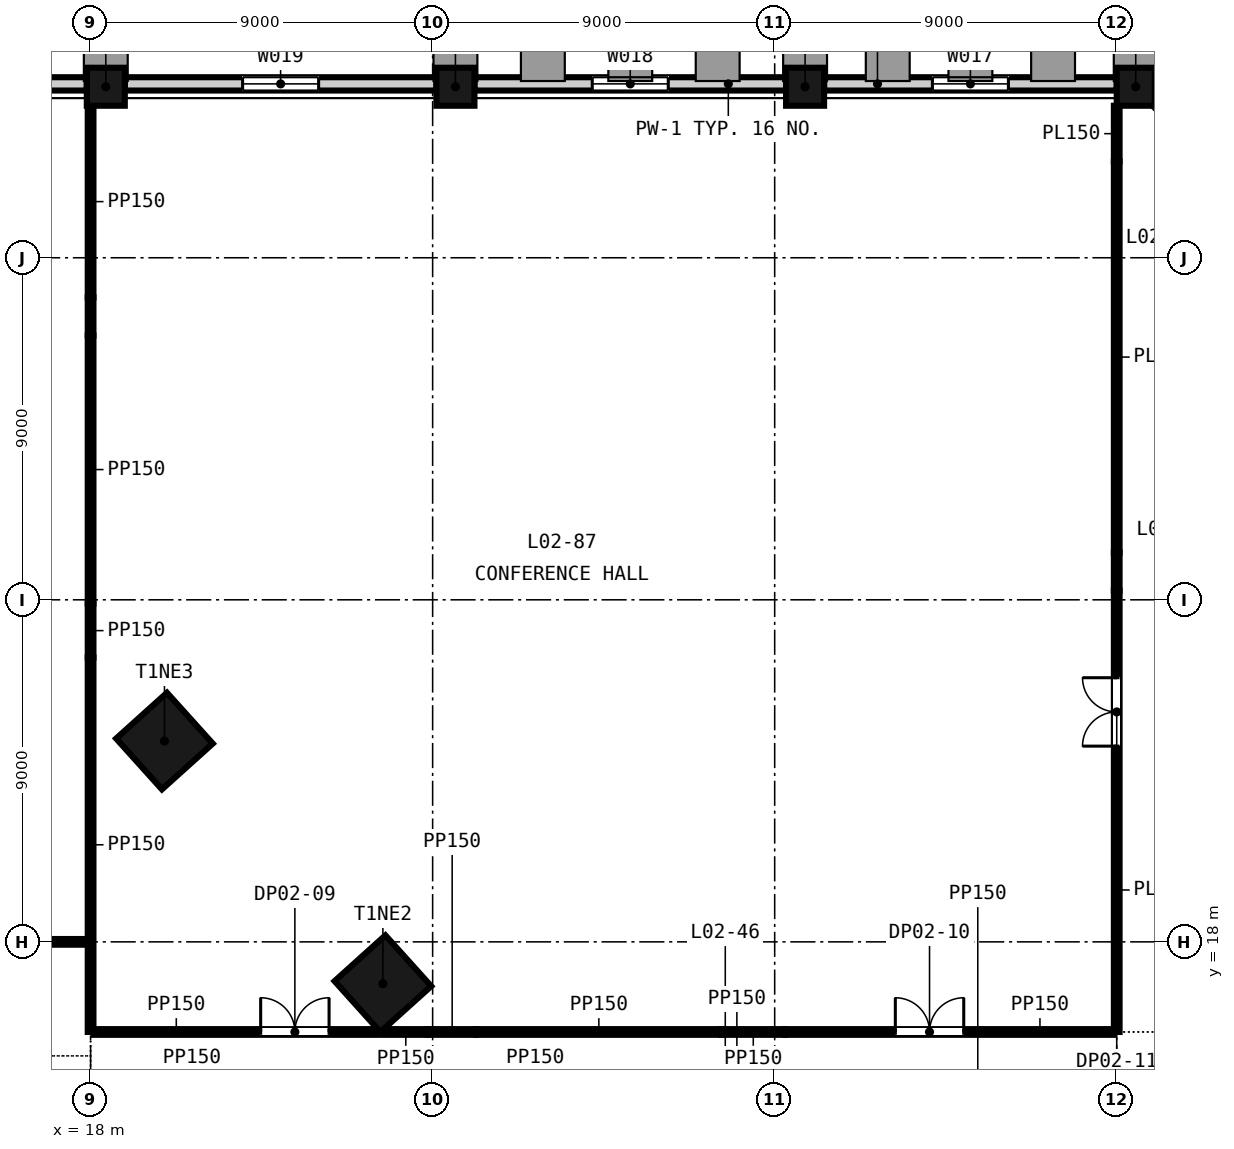
"""IFC4 building model, lengths in metres.
Left out: names, types, materials, properties, quantities, classifications, styles, units other than length and angle.
Written with IfcOpenShell. Run it as: python <this file> out.ifc"""

import sys

from ifc_helpers import new_model, si_unit, direction, frame, frame_2d, origin, origin_2d, place, context, subcontext, project, spatial, rectangle, extrude, element, fill, save


model = new_model("IFC4")
c1 = context("Model", 3, precision=1e-05, world=origin(), true_north=direction((0.0, 1.0)))
c2 = subcontext(c1, "Body", "Model", "MODEL_VIEW")
j1 = project(units=[si_unit("LENGTHUNIT", "METRE"), si_unit("PLANEANGLEUNIT", "RADIAN")], contexts=[c1])
p1 = place(None, origin())
s1 = spatial("IfcSite", under=j1, at=p1, CompositionType="ELEMENT")
p2 = place(p1, origin())
s2 = spatial("IfcBuilding", under=s1, at=p2, CompositionType="ELEMENT")
p3 = place(p2, frame((0.0, 0.0, 18.0)))
s3 = spatial("IfcBuildingStorey", under=s2, at=p3, CompositionType="ELEMENT", Elevation=18.0)
for number, where, z_axis, x_axis in (
    (1, (25.691, 16.9, -0.4), (0.0, 0.0, 1.0), (-0.669, 0.743, 0.0)),
    (2, (19.944, 23.283, -0.4), (0.0, 0.0, 1.0), (-0.669, 0.743, 0.0)),
):
    element("IfcColumn", number, at=place(p3, frame(where, z_axis=z_axis, x_axis=x_axis)), inside=s3, PredefinedType="COLUMN", context=c2, shape_type="SweptSolid", body=[
        extrude(rectangle(XDim=1.8, YDim=1.8, at=origin_2d()), origin(), (0.0, 0.0, 1.0), 4.6),
    ])
for number, where, z_axis, x_axis in (
    (3, (45.5, 40.5, -0.4), (0.0, 0.0, 1.0), (-1.0, 0.0, 0.0)),
    (4, (36.8, 40.5, -0.4), (0.0, 0.0, 1.0), (-1.0, 0.0, 0.0)),
    (5, (27.6, 40.5, -0.4), (0.0, 0.0, 1.0), (-1.0, 0.0, 0.0)),
    (6, (18.4, 40.5, -0.4), (0.0, 0.0, 1.0), (-1.0, 0.0, 0.0)),
):
    element("IfcColumn", number, at=place(p3, frame(where, z_axis=z_axis, x_axis=x_axis)), inside=s3, PredefinedType="COLUMN", context=c2, shape_type="SweptSolid", body=[
        extrude(rectangle(XDim=1.0, YDim=1.0, at=origin_2d()), origin(), (0.0, 0.0, 1.0), 4.6),
    ])
p4 = place(p3, frame((51.327, 35.072, -0.4), z_axis=(0.0, 0.0, 1.0), x_axis=(-0.707106781187, 0.707106781187, 0.0)))
e7 = element("IfcWall", 7, at=p4, inside=s3, PredefinedType="SOLIDWALL", context=c2, shape_type="SweptSolid", body=[
    extrude(rectangle(XDim=7.433, YDim=0.35, at=frame_2d((3.716, 0.0))), origin(), (0.0, 0.0, 1.0), 3.7),
])
p5 = place(p3, frame((45.0, 40.575, -0.4), z_axis=(0.0, 0.0, 1.0), x_axis=(-1.0, 0.0, 0.0)))
e8 = element("IfcWall", 8, at=p5, inside=s3, PredefinedType="SOLIDWALL", context=c2, shape_type="SweptSolid", body=[
    extrude(rectangle(XDim=7.7, YDim=0.35, at=frame_2d((3.85, 0.0))), origin(), (0.0, 0.0, 1.0), 3.7),
])
p6 = place(p5, frame((2.85, 0.0, 1.3)))
e9 = element("IfcOpeningElement", 9, at=p6, cuts=e8, PredefinedType="OPENING", context=c2, shape_type="SweptSolid", body=[
    extrude(rectangle(XDim=2.0, YDim=2.35, at=frame_2d((1.0, 1.175))), frame((0.0, 0.185, 0.0), z_axis=(0.0, -1.0, 0.0), x_axis=(1.0, 0.0, 0.0)), (0.0, 0.0, 1.0), 0.37),
])
p7 = place(p3, frame((36.3, 40.575, -0.4), z_axis=(0.0, 0.0, 1.0), x_axis=(-1.0, 0.0, 0.0)))
e10 = element("IfcWall", 10, at=p7, inside=s3, PredefinedType="SOLIDWALL", context=c2, shape_type="SweptSolid", body=[
    extrude(rectangle(XDim=8.2, YDim=0.35, at=frame_2d((4.1, 0.0))), origin(), (0.0, 0.0, 1.0), 3.7),
])
p8 = place(p7, frame((3.1, 0.0, 1.3)))
e11 = element("IfcOpeningElement", 11, at=p8, cuts=e10, PredefinedType="OPENING", context=c2, shape_type="SweptSolid", body=[
    extrude(rectangle(XDim=2.0, YDim=2.35, at=frame_2d((1.0, 1.175))), frame((0.0, 0.185, 0.0), z_axis=(0.0, -1.0, 0.0), x_axis=(1.0, 0.0, 0.0)), (0.0, 0.0, 1.0), 0.37),
])
p9 = place(p3, frame((27.1, 40.575, -0.4), z_axis=(0.0, 0.0, 1.0), x_axis=(-1.0, 0.0, 0.0)))
e12 = element("IfcWall", 12, at=p9, inside=s3, PredefinedType="SOLIDWALL", context=c2, shape_type="SweptSolid", body=[
    extrude(rectangle(XDim=8.2, YDim=0.35, at=frame_2d((4.1, 0.0))), origin(), (0.0, 0.0, 1.0), 3.7),
])
p10 = place(p9, frame((3.1, 0.0, 1.3)))
e13 = element("IfcOpeningElement", 13, at=p10, cuts=e12, PredefinedType="OPENING", context=c2, shape_type="SweptSolid", body=[
    extrude(rectangle(XDim=2.0, YDim=2.35, at=frame_2d((1.0, 1.175))), frame((0.0, 0.185, 0.0), z_axis=(0.0, -1.0, 0.0), x_axis=(1.0, 0.0, 0.0)), (0.0, 0.0, 1.0), 0.37),
])
p11 = place(p3, frame((17.9, 40.575, -0.4), z_axis=(0.0, 0.0, 1.0), x_axis=(-1.0, 0.0, 0.0)))
e14 = element("IfcWall", 14, at=p11, inside=s3, PredefinedType="SOLIDWALL", context=c2, shape_type="SweptSolid", body=[
    extrude(rectangle(XDim=8.2, YDim=0.35, at=frame_2d((4.1, 0.0))), origin(), (0.0, 0.0, 1.0), 3.7),
])
p12 = place(p11, frame((3.1, 0.0, 1.3)))
e15 = element("IfcOpeningElement", 15, at=p12, cuts=e14, PredefinedType="OPENING", context=c2, shape_type="SweptSolid", body=[
    extrude(rectangle(XDim=2.0, YDim=2.35, at=frame_2d((1.0, 1.175))), frame((0.0, 0.185, 0.0), z_axis=(0.0, -1.0, 0.0), x_axis=(1.0, 0.0, 0.0)), (0.0, 0.0, 1.0), 0.37),
])
p13 = place(p3, frame((18.075, 15.629, 0.0), z_axis=(0.0, 0.0, 1.0), x_axis=(1.0, 0.0, 0.0)))
e16 = element("IfcWall", 16, at=p13, inside=s3, PredefinedType="PARTITIONING", context=c2, shape_type="SweptSolid", body=[
    extrude(rectangle(XDim=7.482, YDim=0.15, at=frame_2d((3.741, 0.0))), origin(), (0.0, 0.0, 1.0), 4.2),
])
p14 = place(p13, frame((4.4, 0.0, 0.0)))
e17 = element("IfcOpeningElement", 17, at=p14, cuts=e16, PredefinedType="OPENING", context=c2, shape_type="SweptSolid", body=[
    extrude(rectangle(XDim=1.8, YDim=2.4, at=frame_2d((0.9, 1.2))), frame((0.0, 0.085, 0.0), z_axis=(0.0, -1.0, 0.0), x_axis=(1.0, 0.0, 0.0)), (0.0, 0.0, 1.0), 0.17),
])
p15 = place(p3, frame((25.708, 15.629, 0.0), z_axis=(0.0, 0.0, 1.0), x_axis=(1.0, 0.0, 0.0)))
e18 = element("IfcWall", 18, at=p15, inside=s3, PredefinedType="PARTITIONING", context=c2, shape_type="SweptSolid", body=[
    extrude(rectangle(XDim=1.162, YDim=0.15, at=frame_2d((0.581, 0.0))), origin(), (0.0, 0.0, 1.0), 4.2),
])
p16 = place(p3, frame((26.869, 15.629, 0.0), z_axis=(0.0, 0.0, 1.0), x_axis=(1.0, 0.0, 0.0)))
e19 = element("IfcWall", 19, at=p16, inside=s3, PredefinedType="PARTITIONING", context=c2, shape_type="SweptSolid", body=[
    extrude(rectangle(XDim=1.278, YDim=0.15, at=frame_2d((0.639, 0.0))), origin(), (0.0, 0.0, 1.0), 3.2),
])
p17 = place(p3, frame((28.148, 15.629, 0.0), z_axis=(0.0, 0.0, 1.0), x_axis=(1.0, 0.0, 0.0)))
e20 = element("IfcWall", 20, at=p17, inside=s3, PredefinedType="PARTITIONING", context=c2, shape_type="SweptSolid", body=[
    extrude(rectangle(XDim=6.441, YDim=0.15, at=frame_2d((3.221, 0.0))), origin(), (0.0, 0.0, 1.0), 4.2),
])
p18 = place(p3, frame((34.589, 15.629, 0.0), z_axis=(0.0, 0.0, 1.0), x_axis=(1.0, 0.0, 0.0)))
e21 = element("IfcWall", 21, at=p18, inside=s3, PredefinedType="PARTITIONING", context=c2, shape_type="SweptSolid", body=[
    extrude(rectangle(XDim=1.685, YDim=0.15, at=frame_2d((0.843, 0.0))), origin(), (0.0, 0.0, 1.0), 3.219),
])
p19 = place(p3, frame((36.274, 15.629, 0.0), z_axis=(0.0, 0.0, 1.0), x_axis=(1.0, 0.0, 0.0)))
e22 = element("IfcWall", 22, at=p19, inside=s3, PredefinedType="PARTITIONING", context=c2, shape_type="SweptSolid", body=[
    extrude(rectangle(XDim=8.651, YDim=0.15, at=frame_2d((4.325, 0.0))), origin(), (0.0, 0.0, 1.0), 4.2),
])
p20 = place(p19, frame((2.9, 0.0, 0.0)))
e23 = element("IfcOpeningElement", 23, at=p20, cuts=e22, PredefinedType="OPENING", context=c2, shape_type="SweptSolid", body=[
    extrude(rectangle(XDim=1.8, YDim=2.4, at=frame_2d((0.9, 1.2))), frame((0.0, 0.085, 0.0), z_axis=(0.0, -1.0, 0.0), x_axis=(1.0, 0.0, 0.0)), (0.0, 0.0, 1.0), 0.17),
])
p21 = place(p3, frame((-9.9, 18.0, 0.0), z_axis=(0.0, 0.0, 1.0), x_axis=(1.0, 0.0, 0.0)))
e24 = element("IfcWall", 24, at=p21, inside=s3, PredefinedType="PARTITIONING", context=c2, shape_type="SweptSolid", body=[
    extrude(rectangle(XDim=27.825, YDim=0.15, at=frame_2d((13.913, 0.0))), origin(), (0.0, 0.0, 1.0), 4.2),
])
p22 = place(p21, frame((4.4, 0.0, 0.0)))
e25 = element("IfcOpeningElement", 25, at=p22, cuts=e24, PredefinedType="OPENING", context=c2, shape_type="SweptSolid", body=[
    extrude(rectangle(XDim=1.0, YDim=2.1, at=frame_2d((0.5, 1.05))), frame((0.0, 0.085, 0.0), z_axis=(0.0, -1.0, 0.0), x_axis=(1.0, 0.0, 0.0)), (0.0, 0.0, 1.0), 0.17),
])
p23 = place(p21, frame((13.3, 0.0, 0.0)))
e26 = element("IfcOpeningElement", 26, at=p23, cuts=e24, PredefinedType="OPENING", context=c2, shape_type="SweptSolid", body=[
    extrude(rectangle(XDim=1.0, YDim=2.1, at=frame_2d((0.5, 1.05))), frame((0.0, 0.085, 0.0), z_axis=(0.0, -1.0, 0.0), x_axis=(1.0, 0.0, 0.0)), (0.0, 0.0, 1.0), 0.17),
])
p24 = place(p21, frame((22.3, 0.0, 0.0)))
e27 = element("IfcOpeningElement", 27, at=p24, cuts=e24, PredefinedType="OPENING", context=c2, shape_type="SweptSolid", body=[
    extrude(rectangle(XDim=1.0, YDim=2.1, at=frame_2d((0.5, 1.05))), frame((0.0, 0.085, 0.0), z_axis=(0.0, -1.0, 0.0), x_axis=(1.0, 0.0, 0.0)), (0.0, 0.0, 1.0), 0.17),
])
p25 = place(p3, frame((18.0, 15.629, 0.0), z_axis=(0.0, 0.0, 1.0), x_axis=(0.0, 1.0, 0.0)))
e28 = element("IfcWall", 28, at=p25, inside=s3, PredefinedType="PARTITIONING", context=c2, shape_type="SweptSolid", body=[
    extrude(rectangle(XDim=9.85, YDim=0.15, at=frame_2d((4.925, 0.0))), origin(), (0.0, 0.0, 1.0), 4.2),
])
p26 = place(p3, frame((18.0, 25.479, 0.0), z_axis=(0.0, 0.0, 1.0), x_axis=(0.0, 1.0, 0.0)))
e29 = element("IfcWall", 29, at=p26, inside=s3, PredefinedType="PARTITIONING", context=c2, shape_type="SweptSolid", body=[
    extrude(rectangle(XDim=1.42, YDim=0.15, at=frame_2d((0.71, 0.0))), origin(), (0.0, 0.0, 1.0), 3.2),
])
p27 = place(p3, frame((18.0, 26.899, 0.0), z_axis=(0.0, 0.0, 1.0), x_axis=(0.0, 1.0, 0.0)))
e30 = element("IfcWall", 30, at=p27, inside=s3, PredefinedType="PARTITIONING", context=c2, shape_type="SweptSolid", body=[
    extrude(rectangle(XDim=7.055, YDim=0.15, at=frame_2d((3.528, 0.0))), origin(), (0.0, 0.0, 1.0), 4.2),
])
p28 = place(p3, frame((18.0, 33.955, 0.0), z_axis=(0.0, 0.0, 1.0), x_axis=(0.0, 1.0, 0.0)))
e31 = element("IfcWall", 31, at=p28, inside=s3, PredefinedType="PARTITIONING", context=c2, shape_type="SweptSolid", body=[
    extrude(rectangle(XDim=1.0, YDim=0.15, at=frame_2d((0.5, 0.0))), origin(), (0.0, 0.0, 1.0), 3.451),
])
p29 = place(p3, frame((18.0, 34.955, 0.0), z_axis=(0.0, 0.0, 1.0), x_axis=(0.0, 1.0, 0.0)))
e32 = element("IfcWall", 32, at=p29, inside=s3, PredefinedType="PARTITIONING", context=c2, shape_type="SweptSolid", body=[
    extrude(rectangle(XDim=5.045, YDim=0.15, at=frame_2d((2.523, 0.0))), origin(), (0.0, 0.0, 1.0), 4.2),
])
p30 = place(p3, frame((45.0, 15.629, 0.0), z_axis=(0.0, 0.0, 1.0), x_axis=(0.0, 1.0, 0.0)))
e33 = element("IfcWall", 33, at=p30, inside=s3, PredefinedType="PARTITIONING", context=c2, shape_type="SweptSolid", body=[
    extrude(rectangle(XDim=11.614, YDim=0.15, at=frame_2d((5.807, 0.0))), origin(), (0.0, 0.0, 1.0), 4.2),
])
p31 = place(p30, frame((7.521, 0.0, 0.0)))
e34 = element("IfcOpeningElement", 34, at=p31, cuts=e33, PredefinedType="OPENING", context=c2, shape_type="SweptSolid", body=[
    extrude(rectangle(XDim=1.8, YDim=2.4, at=frame_2d((0.9, 1.2))), frame((0.0, 0.085, 0.0), z_axis=(0.0, -1.0, 0.0), x_axis=(1.0, 0.0, 0.0)), (0.0, 0.0, 1.0), 0.17),
])
p32 = place(p3, frame((45.0, 27.243, 0.0), z_axis=(0.0, 0.0, 1.0), x_axis=(0.0, 1.0, 0.0)))
e35 = element("IfcWall", 35, at=p32, inside=s3, PredefinedType="PARTITIONING", context=c2, shape_type="SweptSolid", body=[
    extrude(rectangle(XDim=1.0, YDim=0.15, at=frame_2d((0.5, 0.0))), origin(), (0.0, 0.0, 1.0), 3.111),
])
p33 = place(p3, frame((45.0, 28.243, 0.0), z_axis=(0.0, 0.0, 1.0), x_axis=(0.0, 1.0, 0.0)))
e36 = element("IfcWall", 36, at=p33, inside=s3, PredefinedType="PARTITIONING", context=c2, shape_type="SweptSolid", body=[
    extrude(rectangle(XDim=10.288, YDim=0.15, at=frame_2d((5.144, 0.0))), origin(), (0.0, 0.0, 1.0), 4.2),
])
p34 = place(p3, frame((45.0, 38.531, 0.0), z_axis=(0.0, 0.0, 1.0), x_axis=(0.0, 1.0, 0.0)))
e37 = element("IfcWall", 37, at=p34, inside=s3, PredefinedType="PARTITIONING", context=c2, shape_type="SweptSolid", body=[
    extrude(rectangle(XDim=1.469, YDim=0.15, at=frame_2d((0.735, 0.0))), origin(), (0.0, 0.0, 1.0), 3.111),
])
p35 = place(p6, origin())
e38 = element("IfcWindow", 38, at=p35, inside=s3, PartitioningType="SINGLE_PANEL", PredefinedType="WINDOW", context=c2, shape_type="SweptSolid", body=[
    extrude(rectangle(XDim=2.0, YDim=2.35, at=frame_2d((1.0, 1.175))), frame((0.0, 0.03, 0.0), z_axis=(0.0, -1.0, 0.0), x_axis=(1.0, 0.0, 0.0)), (0.0, 0.0, 1.0), 0.06),
])
fill(e9, e38)
p36 = place(p8, origin())
e39 = element("IfcWindow", 39, at=p36, inside=s3, PartitioningType="SINGLE_PANEL", PredefinedType="WINDOW", context=c2, shape_type="SweptSolid", body=[
    extrude(rectangle(XDim=2.0, YDim=2.35, at=frame_2d((1.0, 1.175))), frame((0.0, 0.03, 0.0), z_axis=(0.0, -1.0, 0.0), x_axis=(1.0, 0.0, 0.0)), (0.0, 0.0, 1.0), 0.06),
])
fill(e11, e39)
p37 = place(p10, origin())
e40 = element("IfcWindow", 40, at=p37, inside=s3, PartitioningType="SINGLE_PANEL", PredefinedType="WINDOW", context=c2, shape_type="SweptSolid", body=[
    extrude(rectangle(XDim=2.0, YDim=2.35, at=frame_2d((1.0, 1.175))), frame((0.0, 0.03, 0.0), z_axis=(0.0, -1.0, 0.0), x_axis=(1.0, 0.0, 0.0)), (0.0, 0.0, 1.0), 0.06),
])
fill(e13, e40)
p38 = place(p14, origin())
e41 = element("IfcDoor", 41, at=p38, inside=s3, OperationType="SINGLE_SWING_LEFT", PredefinedType="DOOR", context=c2, shape_type="SweptSolid", body=[
    extrude(rectangle(XDim=1.8, YDim=2.4, at=frame_2d((0.9, 1.2))), frame((0.0, 0.025, 0.0), z_axis=(0.0, -1.0, 0.0), x_axis=(1.0, 0.0, 0.0)), (0.0, 0.0, 1.0), 0.05),
])
fill(e17, e41)
p39 = place(p20, origin())
e42 = element("IfcDoor", 42, at=p39, inside=s3, OperationType="SINGLE_SWING_LEFT", PredefinedType="DOOR", context=c2, shape_type="SweptSolid", body=[
    extrude(rectangle(XDim=1.8, YDim=2.4, at=frame_2d((0.9, 1.2))), frame((0.0, 0.025, 0.0), z_axis=(0.0, -1.0, 0.0), x_axis=(1.0, 0.0, 0.0)), (0.0, 0.0, 1.0), 0.05),
])
fill(e23, e42)
p40 = place(p31, origin())
e43 = element("IfcDoor", 43, at=p40, inside=s3, OperationType="SINGLE_SWING_LEFT", PredefinedType="DOOR", context=c2, shape_type="SweptSolid", body=[
    extrude(rectangle(XDim=1.8, YDim=2.4, at=frame_2d((0.9, 1.2))), frame((0.0, 0.025, 0.0), z_axis=(0.0, -1.0, 0.0), x_axis=(1.0, 0.0, 0.0)), (0.0, 0.0, 1.0), 0.05),
])
fill(e34, e43)
save(model, sys.argv[1])
